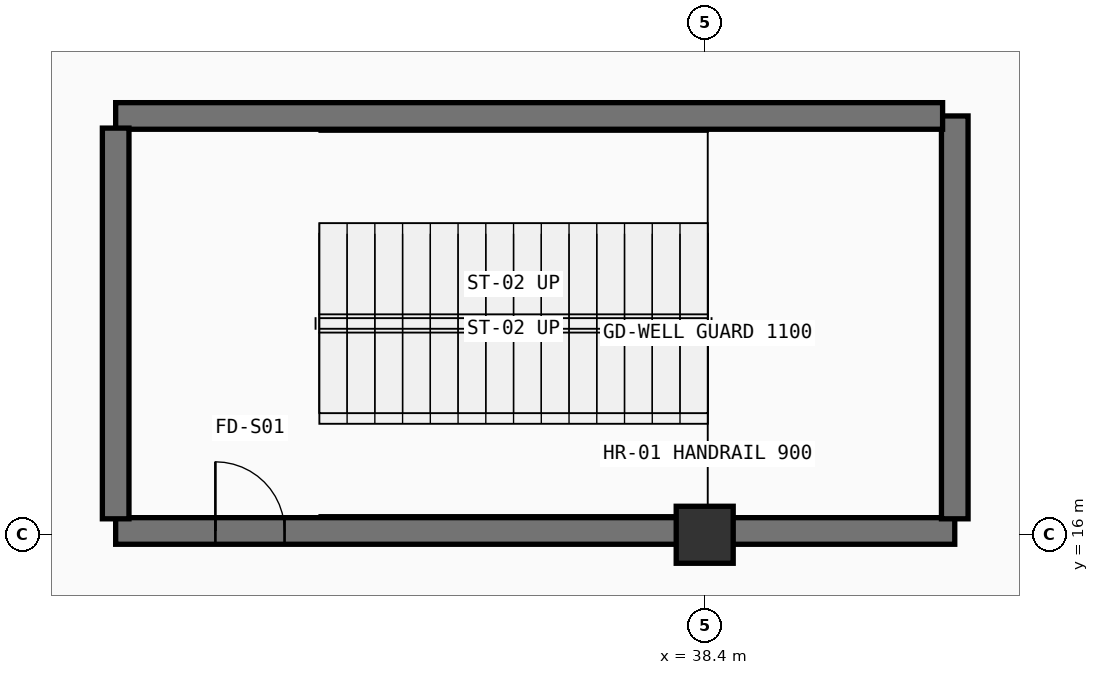
"""IFC4 building model, lengths in metres.
Left out: names, types, materials, properties, quantities, classifications, styles, units other than length and angle.
Written with IfcOpenShell. Run it as: python <this file> out.ifc"""

import sys

from ifc_helpers import new_model, si_unit, direction, frame, frame_2d, origin, origin_2d, place, context, subcontext, project, spatial, rectangle, extrude, element, fill, save


model = new_model("IFC4")
c1 = context("Model", 3, precision=1e-05, world=origin(), true_north=direction((0.0, 1.0)))
c2 = subcontext(c1, "Body", "Model", "MODEL_VIEW")
j1 = project(units=[si_unit("LENGTHUNIT", "METRE"), si_unit("PLANEANGLEUNIT", "RADIAN")], contexts=[c1])
p1 = place(None, origin())
s1 = spatial("IfcSite", under=j1, at=p1, CompositionType="ELEMENT")
p2 = place(p1, origin())
s2 = spatial("IfcBuilding", under=s1, at=p2, CompositionType="ELEMENT")
p3 = place(p2, frame((0.0, 0.0, -5.4)))
s3 = spatial("IfcBuildingStorey", under=s2, at=p3, CompositionType="ELEMENT", Elevation=-5.4)
p4 = place(p3, frame((38.4, 16.0, 0.0), z_axis=(0.0, 0.0, 1.0), x_axis=(1.0, 0.0, 0.0)))
e1 = element("IfcColumn", 1, at=p4, inside=s3, PredefinedType="COLUMN", context=c2, shape_type="SweptSolid", body=[
    extrude(rectangle(XDim=0.75, YDim=0.75, at=origin_2d()), origin(), (0.0, 0.0, 1.0), 5.4),
])
p5 = place(p3, frame((30.65, 16.05, 0.0), z_axis=(0.0, 0.0, 1.0), x_axis=(1.0, 0.0, 0.0)))
e2 = element("IfcWall", 2, at=p5, inside=s3, PredefinedType="SHEAR", context=c2, shape_type="SweptSolid", body=[
    extrude(rectangle(XDim=11.04, YDim=0.35, at=frame_2d((5.52, 0.0))), origin(), (0.0, 0.0, 1.0), 5.09),
])
p6 = place(p5, frame((1.312, 0.0, 0.0)))
e3 = element("IfcOpeningElement", 3, at=p6, cuts=e2, PredefinedType="OPENING", context=c2, shape_type="SweptSolid", body=[
    extrude(rectangle(XDim=0.91, YDim=2.08, at=frame_2d((0.455, 1.04))), frame((0.0, 0.185, 0.0), z_axis=(0.0, -1.0, 0.0), x_axis=(1.0, 0.0, 0.0)), (0.0, 0.0, 1.0), 0.37),
])
p7 = place(p3, frame((41.69, 16.21, 0.0), z_axis=(0.0, 0.0, 1.0), x_axis=(0.0, 1.0, 0.0)))
e4 = element("IfcWall", 4, at=p7, inside=s3, PredefinedType="SHEAR", context=c2, shape_type="SweptSolid", body=[
    extrude(rectangle(XDim=5.3, YDim=0.35, at=frame_2d((2.65, 0.0))), origin(), (0.0, 0.0, 1.0), 5.09),
])
p8 = place(p3, frame((41.53, 21.51, 0.0), z_axis=(0.0, 0.0, 1.0), x_axis=(-1.0, 0.0, 0.0)))
e5 = element("IfcWall", 5, at=p8, inside=s3, PredefinedType="SHEAR", context=c2, shape_type="SweptSolid", body=[
    extrude(rectangle(XDim=10.88, YDim=0.35, at=frame_2d((5.44, 0.0))), origin(), (0.0, 0.0, 1.0), 5.09),
])
p9 = place(p3, frame((30.65, 21.35, 0.0), z_axis=(0.0, 0.0, 1.0), x_axis=(0.0, -1.0, 0.0)))
e6 = element("IfcWall", 6, at=p9, inside=s3, PredefinedType="SHEAR", context=c2, shape_type="SweptSolid", body=[
    extrude(rectangle(XDim=5.14, YDim=0.35, at=frame_2d((2.57, 0.0))), origin(), (0.0, 0.0, 1.0), 5.09),
])
p10 = place(p6, origin())
e7 = element("IfcDoor", 7, at=p10, inside=s3, OperationType="SINGLE_SWING_RIGHT", PredefinedType="DOOR", context=c2, shape_type="SweptSolid", body=[
    extrude(rectangle(XDim=0.91, YDim=2.08, at=frame_2d((0.455, 1.04))), frame((0.0, 0.025, 0.0), z_axis=(0.0, -1.0, 0.0), x_axis=(1.0, 0.0, 0.0)), (0.0, 0.0, 1.0), 0.05),
])
fill(e3, e7)
save(model, sys.argv[1])
